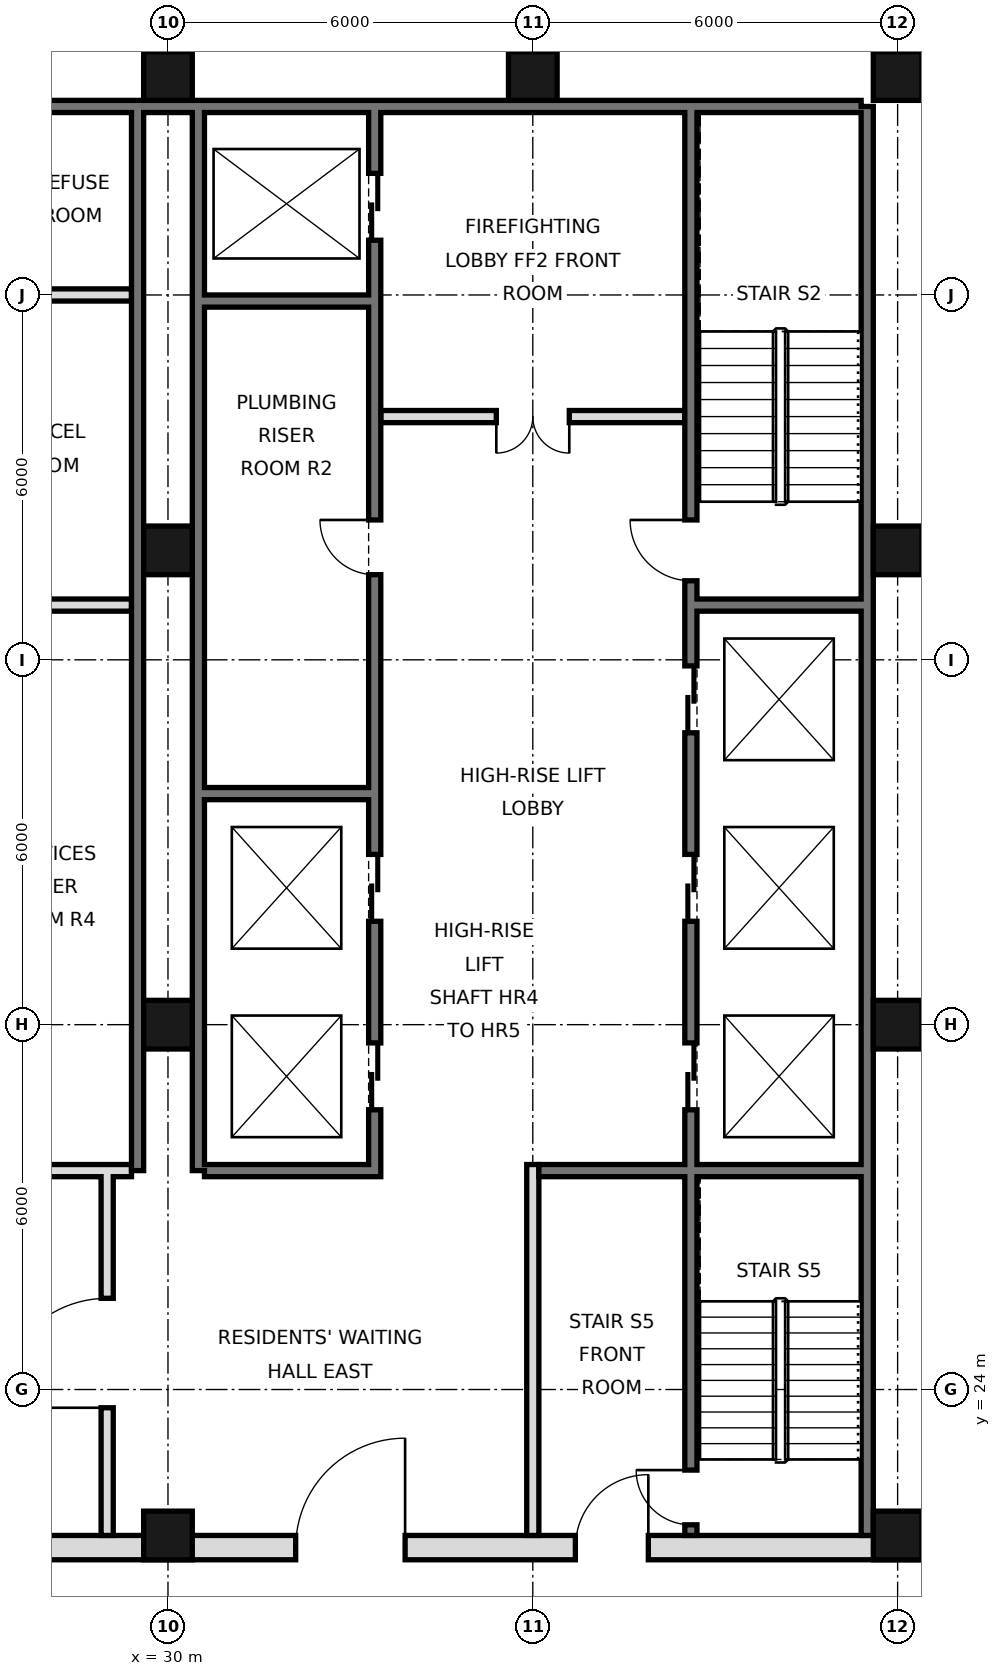
"""IFC4 building model, lengths in metres.
Left out: names, types, materials, properties, quantities, classifications, styles, units other than length and angle.
Written with IfcOpenShell. Run it as: python <this file> out.ifc"""

import sys

from ifc_helpers import new_model, si_unit, direction, frame, frame_2d, origin, origin_2d, place, context, subcontext, project, spatial, rectangle, hollow_rectangle, extrude, element, fill, save


model = new_model("IFC4")
c1 = context("Model", 3, precision=1e-05, world=origin(), true_north=direction((0.0, 1.0)))
c2 = subcontext(c1, "Body", "Model", "MODEL_VIEW")
j1 = project(units=[si_unit("LENGTHUNIT", "METRE"), si_unit("PLANEANGLEUNIT", "RADIAN")], contexts=[c1])
p1 = place(None, origin())
s1 = spatial("IfcSite", under=j1, at=p1, CompositionType="ELEMENT")
p2 = place(p1, origin())
s2 = spatial("IfcBuilding", under=s1, at=p2, CompositionType="ELEMENT")
p3 = place(p2, frame((0.0, 0.0, 270.2)))
s3 = spatial("IfcBuildingStorey", under=s2, at=p3, CompositionType="ELEMENT", Elevation=270.2)
for number, where, z_axis, x_axis in (
    (1, (30.0, 21.6, 0.0), (0.0, 0.0, 1.0), (1.0, 0.0, 0.0)),
    (2, (30.0, 30.0, 0.0), (0.0, 0.0, 1.0), (1.0, 0.0, 0.0)),
    (3, (30.0, 37.8, 0.0), (0.0, 0.0, 1.0), (1.0, 0.0, 0.0)),
    (4, (30.0, 45.6, 0.0), (0.0, 0.0, 1.0), (1.0, 0.0, 0.0)),
    (5, (36.0, 45.6, 0.0), (0.0, 0.0, 1.0), (1.0, 0.0, 0.0)),
    (6, (42.0, 21.6, 0.0), (0.0, 0.0, 1.0), (1.0, 0.0, 0.0)),
    (7, (42.0, 30.0, 0.0), (0.0, 0.0, 1.0), (1.0, 0.0, 0.0)),
    (8, (42.0, 37.8, 0.0), (0.0, 0.0, 1.0), (1.0, 0.0, 0.0)),
    (9, (42.0, 45.6, 0.0), (0.0, 0.0, 1.0), (1.0, 0.0, 0.0)),
):
    element("IfcColumn", number, at=place(p3, frame(where, z_axis=z_axis, x_axis=x_axis)), inside=s3, PredefinedType="COLUMN", context=c2, shape_type="SweptSolid", body=[
        extrude(hollow_rectangle(XDim=0.8, YDim=0.8, WallThickness=0.032, at=origin_2d()), origin(), (0.0, 0.0, 1.0), 3.6),
    ])
p4 = place(p3, frame((41.5, 21.6, 0.0), z_axis=(0.0, 0.0, 1.0), x_axis=(0.0, 1.0, 0.0)))
e10 = element("IfcWall", 10, at=p4, inside=s3, PredefinedType="SOLIDWALL", context=c2, shape_type="SweptSolid", body=[
    extrude(rectangle(XDim=23.5, YDim=0.2, at=frame_2d((11.75, 0.0))), origin(), (0.0, 0.0, 1.0), 3.42),
])
p5 = place(p3, frame((6.6, 45.1, 0.0), z_axis=(0.0, 0.0, 1.0), x_axis=(1.0, 0.0, 0.0)))
e11 = element("IfcWall", 11, at=p5, inside=s3, PredefinedType="SOLIDWALL", context=c2, shape_type="SweptSolid", body=[
    extrude(rectangle(XDim=34.8, YDim=0.2, at=frame_2d((17.4, 0.0))), origin(), (0.0, 0.0, 1.0), 3.42),
])
for number, where, z_axis, x_axis in (
    (12, (29.5, 27.6, 0.0), (0.0, 0.0, 1.0), (0.0, 1.0, 0.0)),
    (13, (30.5, 27.6, 0.0), (0.0, 0.0, 1.0), (0.0, 1.0, 0.0)),
):
    element("IfcWall", number, at=place(p3, frame(where, z_axis=z_axis, x_axis=x_axis)), inside=s3, PredefinedType="SOLIDWALL", context=c2, shape_type="SweptSolid", body=[
        extrude(rectangle(XDim=17.5, YDim=0.2, at=frame_2d((8.75, 0.0))), origin(), (0.0, 0.0, 1.0), 3.42),
    ])
p6 = place(p3, frame((5.6, 21.4, 0.0), z_axis=(0.0, 0.0, 1.0), x_axis=(1.0, 0.0, 0.0)))
e14 = element("IfcWall", 14, at=p6, inside=s3, PredefinedType="SOLIDWALL", context=c2, shape_type="SweptSolid", body=[
    extrude(rectangle(XDim=36.8, YDim=0.4, at=frame_2d((18.4, 0.0))), origin(), (0.0, 0.0, 1.0), 3.42),
])
p7 = place(p6, frame((8.5, 0.0, 0.0)))
e15 = element("IfcOpeningElement", 15, at=p7, cuts=e14, PredefinedType="OPENING", context=c2, shape_type="SweptSolid", body=[
    extrude(rectangle(XDim=1.8, YDim=2.1, at=frame_2d((0.9, 1.05))), frame((0.0, 0.21, 0.0), z_axis=(0.0, -1.0, 0.0), x_axis=(1.0, 0.0, 0.0)), (0.0, 0.0, 1.0), 0.42),
])
p8 = place(p6, frame((17.5, 0.0, 0.0)))
e16 = element("IfcOpeningElement", 16, at=p8, cuts=e14, PredefinedType="OPENING", context=c2, shape_type="SweptSolid", body=[
    extrude(rectangle(XDim=1.8, YDim=2.1, at=frame_2d((0.9, 1.05))), frame((0.0, 0.21, 0.0), z_axis=(0.0, -1.0, 0.0), x_axis=(1.0, 0.0, 0.0)), (0.0, 0.0, 1.0), 0.42),
])
p9 = place(p6, frame((26.5, 0.0, 0.0)))
e17 = element("IfcOpeningElement", 17, at=p9, cuts=e14, PredefinedType="OPENING", context=c2, shape_type="SweptSolid", body=[
    extrude(rectangle(XDim=1.8, YDim=2.1, at=frame_2d((0.9, 1.05))), frame((0.0, 0.21, 0.0), z_axis=(0.0, -1.0, 0.0), x_axis=(1.0, 0.0, 0.0)), (0.0, 0.0, 1.0), 0.42),
])
p10 = place(p6, frame((4.5, 0.0, 0.0)))
e18 = element("IfcOpeningElement", 18, at=p10, cuts=e14, PredefinedType="OPENING", context=c2, shape_type="SweptSolid", body=[
    extrude(rectangle(XDim=1.2, YDim=2.1, at=frame_2d((0.6, 1.05))), frame((0.0, 0.21, 0.0), z_axis=(0.0, -1.0, 0.0), x_axis=(1.0, 0.0, 0.0)), (0.0, 0.0, 1.0), 0.42),
])
p11 = place(p6, frame((31.1, 0.0, 0.0)))
e19 = element("IfcOpeningElement", 19, at=p11, cuts=e14, PredefinedType="OPENING", context=c2, shape_type="SweptSolid", body=[
    extrude(rectangle(XDim=1.2, YDim=2.1, at=frame_2d((0.6, 1.05))), frame((0.0, 0.21, 0.0), z_axis=(0.0, -1.0, 0.0), x_axis=(1.0, 0.0, 0.0)), (0.0, 0.0, 1.0), 0.42),
])
p12 = place(p3, frame((29.0, 21.6, 0.0), z_axis=(0.0, 0.0, 1.0), x_axis=(0.0, 1.0, 0.0)))
e20 = element("IfcWall", 20, at=p12, inside=s3, PredefinedType="PARTITIONING", context=c2, shape_type="SweptSolid", body=[
    extrude(rectangle(XDim=6.0, YDim=0.2, at=frame_2d((3.0, 0.0))), origin(), (0.0, 0.0, 1.0), 3.42),
])
p13 = place(p12, frame((2.1, 0.0, 0.0)))
e21 = element("IfcOpeningElement", 21, at=p13, cuts=e20, PredefinedType="OPENING", context=c2, shape_type="SweptSolid", body=[
    extrude(rectangle(XDim=1.8, YDim=2.1, at=frame_2d((0.9, 1.05))), frame((0.0, 0.11, 0.0), z_axis=(0.0, -1.0, 0.0), x_axis=(1.0, 0.0, 0.0)), (0.0, 0.0, 1.0), 0.22),
])
p14 = place(p3, frame((33.4, 27.5, 0.0), z_axis=(0.0, 0.0, 1.0), x_axis=(0.0, 1.0, 0.0)))
e22 = element("IfcWall", 22, at=p14, inside=s3, PredefinedType="SOLIDWALL", context=c2, shape_type="SweptSolid", body=[
    extrude(rectangle(XDim=17.5, YDim=0.2, at=frame_2d((8.75, 0.0))), origin(), (0.0, 0.0, 1.0), 3.42),
])
p15 = place(p14, frame((1.1, 0.0, 0.0)))
e23 = element("IfcOpeningElement", 23, at=p15, cuts=e22, PredefinedType="OPENING", context=c2, shape_type="SweptSolid", body=[
    extrude(rectangle(XDim=1.1, YDim=2.1, at=frame_2d((0.55, 1.05))), frame((0.0, 0.11, 0.0), z_axis=(0.0, -1.0, 0.0), x_axis=(1.0, 0.0, 0.0)), (0.0, 0.0, 1.0), 0.22),
])
p16 = place(p14, frame((4.2, 0.0, 0.0)))
e24 = element("IfcOpeningElement", 24, at=p16, cuts=e22, PredefinedType="OPENING", context=c2, shape_type="SweptSolid", body=[
    extrude(rectangle(XDim=1.1, YDim=2.1, at=frame_2d((0.55, 1.05))), frame((0.0, 0.11, 0.0), z_axis=(0.0, -1.0, 0.0), x_axis=(1.0, 0.0, 0.0)), (0.0, 0.0, 1.0), 0.22),
])
p17 = place(p14, frame((15.4, 0.0, 0.0)))
e25 = element("IfcOpeningElement", 25, at=p17, cuts=e22, PredefinedType="OPENING", context=c2, shape_type="SweptSolid", body=[
    extrude(rectangle(XDim=1.1, YDim=2.1, at=frame_2d((0.55, 1.05))), frame((0.0, 0.11, 0.0), z_axis=(0.0, -1.0, 0.0), x_axis=(1.0, 0.0, 0.0)), (0.0, 0.0, 1.0), 0.22),
])
p18 = place(p14, frame((9.9, 0.0, 0.0)))
e26 = element("IfcOpeningElement", 26, at=p18, cuts=e22, PredefinedType="OPENING", context=c2, shape_type="SweptSolid", body=[
    extrude(rectangle(XDim=0.9, YDim=2.1, at=frame_2d((0.45, 1.05))), frame((0.0, 0.11, 0.0), z_axis=(0.0, -1.0, 0.0), x_axis=(1.0, 0.0, 0.0)), (0.0, 0.0, 1.0), 0.22),
])
p19 = place(p3, frame((36.0, 21.6, 0.0), z_axis=(0.0, 0.0, 1.0), x_axis=(0.0, 1.0, 0.0)))
e27 = element("IfcWall", 27, at=p19, inside=s3, PredefinedType="PARTITIONING", context=c2, shape_type="SweptSolid", body=[
    extrude(rectangle(XDim=6.1, YDim=0.2, at=frame_2d((3.05, 0.0))), origin(), (0.0, 0.0, 1.0), 3.42),
])
p20 = place(p3, frame((38.6, 21.6, 0.0), z_axis=(0.0, 0.0, 1.0), x_axis=(0.0, 1.0, 0.0)))
e28 = element("IfcWall", 28, at=p20, inside=s3, PredefinedType="SOLIDWALL", context=c2, shape_type="SweptSolid", body=[
    extrude(rectangle(XDim=23.4, YDim=0.2, at=frame_2d((11.7, 0.0))), origin(), (0.0, 0.0, 1.0), 3.42),
])
p21 = place(p20, frame((7.0, 0.0, 0.0)))
e29 = element("IfcOpeningElement", 29, at=p21, cuts=e28, PredefinedType="OPENING", context=c2, shape_type="SweptSolid", body=[
    extrude(rectangle(XDim=1.1, YDim=2.1, at=frame_2d((0.55, 1.05))), frame((0.0, 0.11, 0.0), z_axis=(0.0, -1.0, 0.0), x_axis=(1.0, 0.0, 0.0)), (0.0, 0.0, 1.0), 0.22),
])
p22 = place(p20, frame((10.1, 0.0, 0.0)))
e30 = element("IfcOpeningElement", 30, at=p22, cuts=e28, PredefinedType="OPENING", context=c2, shape_type="SweptSolid", body=[
    extrude(rectangle(XDim=1.1, YDim=2.1, at=frame_2d((0.55, 1.05))), frame((0.0, 0.11, 0.0), z_axis=(0.0, -1.0, 0.0), x_axis=(1.0, 0.0, 0.0)), (0.0, 0.0, 1.0), 0.22),
])
p23 = place(p20, frame((13.2, 0.0, 0.0)))
e31 = element("IfcOpeningElement", 31, at=p23, cuts=e28, PredefinedType="OPENING", context=c2, shape_type="SweptSolid", body=[
    extrude(rectangle(XDim=1.1, YDim=2.1, at=frame_2d((0.55, 1.05))), frame((0.0, 0.11, 0.0), z_axis=(0.0, -1.0, 0.0), x_axis=(1.0, 0.0, 0.0)), (0.0, 0.0, 1.0), 0.22),
])
p24 = place(p20, frame((15.7, 0.0, 0.0)))
e32 = element("IfcOpeningElement", 32, at=p24, cuts=e28, PredefinedType="OPENING", context=c2, shape_type="SweptSolid", body=[
    extrude(rectangle(XDim=1.0, YDim=2.1, at=frame_2d((0.5, 1.05))), frame((0.0, 0.11, 0.0), z_axis=(0.0, -1.0, 0.0), x_axis=(1.0, 0.0, 0.0)), (0.0, 0.0, 1.0), 0.22),
])
p25 = place(p20, frame((0.175, 0.0, 0.0)))
e33 = element("IfcOpeningElement", 33, at=p25, cuts=e28, PredefinedType="OPENING", context=c2, shape_type="SweptSolid", body=[
    extrude(rectangle(XDim=0.9, YDim=2.1, at=frame_2d((0.45, 1.05))), frame((0.0, 0.11, 0.0), z_axis=(0.0, -1.0, 0.0), x_axis=(1.0, 0.0, 0.0)), (0.0, 0.0, 1.0), 0.22),
])
for number, where, z_axis, x_axis in (
    (34, (26.7, 27.6, 0.0), (0.0, 0.0, 1.0), (1.0, 0.0, 0.0)),
    (35, (30.6, 27.6, 0.0), (0.0, 0.0, 1.0), (1.0, 0.0, 0.0)),
):
    element("IfcWall", number, at=place(p3, frame(where, z_axis=z_axis, x_axis=x_axis)), inside=s3, PredefinedType="SOLIDWALL", context=c2, shape_type="SweptSolid", body=[
        extrude(rectangle(XDim=2.7, YDim=0.2, at=frame_2d((1.35, 0.0))), origin(), (0.0, 0.0, 1.0), 3.42),
    ])
p26 = place(p3, frame((36.1, 27.6, 0.0), z_axis=(0.0, 0.0, 1.0), x_axis=(1.0, 0.0, 0.0)))
e36 = element("IfcWall", 36, at=p26, inside=s3, PredefinedType="SOLIDWALL", context=c2, shape_type="SweptSolid", body=[
    extrude(rectangle(XDim=5.3, YDim=0.2, at=frame_2d((2.65, 0.0))), origin(), (0.0, 0.0, 1.0), 3.42),
])
for number, where, z_axis, x_axis in (
    (37, (30.6, 33.8, 0.0), (0.0, 0.0, 1.0), (1.0, 0.0, 0.0)),
    (38, (26.7, 36.9, 0.0), (0.0, 0.0, 1.0), (1.0, 0.0, 0.0)),
    (39, (38.7, 36.9, 0.0), (0.0, 0.0, 1.0), (1.0, 0.0, 0.0)),
):
    element("IfcWall", number, at=place(p3, frame(where, z_axis=z_axis, x_axis=x_axis)), inside=s3, PredefinedType="SOLIDWALL", context=c2, shape_type="SweptSolid", body=[
        extrude(rectangle(XDim=2.7, YDim=0.2, at=frame_2d((1.35, 0.0))), origin(), (0.0, 0.0, 1.0), 3.42),
    ])
p27 = place(p3, frame((33.5, 40.0, 0.0), z_axis=(0.0, 0.0, 1.0), x_axis=(1.0, 0.0, 0.0)))
e40 = element("IfcWall", 40, at=p27, inside=s3, PredefinedType="PARTITIONING", context=c2, shape_type="SweptSolid", body=[
    extrude(rectangle(XDim=5.0, YDim=0.2, at=frame_2d((2.5, 0.0))), origin(), (0.0, 0.0, 1.0), 3.42),
])
p28 = place(p27, frame((1.9, 0.0, 0.0)))
e41 = element("IfcOpeningElement", 41, at=p28, cuts=e40, PredefinedType="OPENING", context=c2, shape_type="SweptSolid", body=[
    extrude(rectangle(XDim=1.2, YDim=2.1, at=frame_2d((0.6, 1.05))), frame((0.0, 0.11, 0.0), z_axis=(0.0, -1.0, 0.0), x_axis=(1.0, 0.0, 0.0)), (0.0, 0.0, 1.0), 0.22),
])
p29 = place(p3, frame((30.6, 41.9, 0.0), z_axis=(0.0, 0.0, 1.0), x_axis=(1.0, 0.0, 0.0)))
e42 = element("IfcWall", 42, at=p29, inside=s3, PredefinedType="SOLIDWALL", context=c2, shape_type="SweptSolid", body=[
    extrude(rectangle(XDim=2.7, YDim=0.2, at=frame_2d((1.35, 0.0))), origin(), (0.0, 0.0, 1.0), 3.42),
])
p30 = place(p3, frame((26.7, 42.0, 0.0), z_axis=(0.0, 0.0, 1.0), x_axis=(1.0, 0.0, 0.0)))
e43 = element("IfcWall", 43, at=p30, inside=s3, PredefinedType="PARTITIONING", context=c2, shape_type="SweptSolid", body=[
    extrude(rectangle(XDim=2.7, YDim=0.2, at=frame_2d((1.35, 0.0))), origin(), (0.0, 0.0, 1.0), 3.42),
])
p31 = place(p13, origin())
e44 = element("IfcDoor", 44, at=p31, inside=s3, OperationType="SINGLE_SWING_LEFT", PredefinedType="DOOR", context=c2, shape_type="SweptSolid", body=[
    extrude(rectangle(XDim=1.8, YDim=2.1, at=frame_2d((0.9, 1.05))), frame((0.0, 0.025, 0.0), z_axis=(0.0, -1.0, 0.0), x_axis=(1.0, 0.0, 0.0)), (0.0, 0.0, 1.0), 0.05),
])
fill(e21, e44)
p32 = place(p9, frame((1.8, 0.0, 0.0), z_axis=(0.0, 0.0, 1.0), x_axis=(-1.0, 0.0, 0.0)))
e45 = element("IfcDoor", 45, at=p32, inside=s3, OperationType="SINGLE_SWING_LEFT", PredefinedType="DOOR", context=c2, shape_type="SweptSolid", body=[
    extrude(rectangle(XDim=1.8, YDim=2.1, at=frame_2d((0.9, 1.05))), frame((0.0, 0.025, 0.0), z_axis=(0.0, -1.0, 0.0), x_axis=(1.0, 0.0, 0.0)), (0.0, 0.0, 1.0), 0.05),
])
fill(e17, e45)
p33 = place(p11, frame((1.2, 0.0, 0.0), z_axis=(0.0, 0.0, 1.0), x_axis=(-1.0, 0.0, 0.0)))
e46 = element("IfcDoor", 46, at=p33, inside=s3, OperationType="SINGLE_SWING_LEFT", PredefinedType="DOOR", context=c2, shape_type="SweptSolid", body=[
    extrude(rectangle(XDim=1.2, YDim=2.1, at=frame_2d((0.6, 1.05))), frame((0.0, 0.025, 0.0), z_axis=(0.0, -1.0, 0.0), x_axis=(1.0, 0.0, 0.0)), (0.0, 0.0, 1.0), 0.05),
])
fill(e19, e46)
p34 = place(p28, frame((1.2, 0.0, 0.0), z_axis=(0.0, 0.0, 1.0), x_axis=(-1.0, 0.0, 0.0)))
e47 = element("IfcDoor", 47, at=p34, inside=s3, OperationType="DOUBLE_DOOR_SINGLE_SWING", PredefinedType="DOOR", context=c2, shape_type="SweptSolid", body=[
    extrude(rectangle(XDim=1.2, YDim=2.1, at=frame_2d((0.6, 1.05))), frame((0.0, 0.025, 0.0), z_axis=(0.0, -1.0, 0.0), x_axis=(1.0, 0.0, 0.0)), (0.0, 0.0, 1.0), 0.05),
])
fill(e41, e47)
p35 = place(p21, origin())
e48 = element("IfcDoor", 48, at=p35, inside=s3, OperationType="DOUBLE_DOOR_SLIDING", PredefinedType="DOOR", context=c2, shape_type="SweptSolid", body=[
    extrude(rectangle(XDim=1.1, YDim=2.1, at=frame_2d((0.55, 1.05))), frame((0.0, 0.025, 0.0), z_axis=(0.0, -1.0, 0.0), x_axis=(1.0, 0.0, 0.0)), (0.0, 0.0, 1.0), 0.05),
])
fill(e29, e48)
p36 = place(p22, origin())
e49 = element("IfcDoor", 49, at=p36, inside=s3, OperationType="DOUBLE_DOOR_SLIDING", PredefinedType="DOOR", context=c2, shape_type="SweptSolid", body=[
    extrude(rectangle(XDim=1.1, YDim=2.1, at=frame_2d((0.55, 1.05))), frame((0.0, 0.025, 0.0), z_axis=(0.0, -1.0, 0.0), x_axis=(1.0, 0.0, 0.0)), (0.0, 0.0, 1.0), 0.05),
])
fill(e30, e49)
p37 = place(p23, origin())
e50 = element("IfcDoor", 50, at=p37, inside=s3, OperationType="DOUBLE_DOOR_SLIDING", PredefinedType="DOOR", context=c2, shape_type="SweptSolid", body=[
    extrude(rectangle(XDim=1.1, YDim=2.1, at=frame_2d((0.55, 1.05))), frame((0.0, 0.025, 0.0), z_axis=(0.0, -1.0, 0.0), x_axis=(1.0, 0.0, 0.0)), (0.0, 0.0, 1.0), 0.05),
])
fill(e31, e50)
p38 = place(p15, origin())
e51 = element("IfcDoor", 51, at=p38, inside=s3, OperationType="DOUBLE_DOOR_SLIDING", PredefinedType="DOOR", context=c2, shape_type="SweptSolid", body=[
    extrude(rectangle(XDim=1.1, YDim=2.1, at=frame_2d((0.55, 1.05))), frame((0.0, 0.025, 0.0), z_axis=(0.0, -1.0, 0.0), x_axis=(1.0, 0.0, 0.0)), (0.0, 0.0, 1.0), 0.05),
])
fill(e23, e51)
p39 = place(p16, origin())
e52 = element("IfcDoor", 52, at=p39, inside=s3, OperationType="DOUBLE_DOOR_SLIDING", PredefinedType="DOOR", context=c2, shape_type="SweptSolid", body=[
    extrude(rectangle(XDim=1.1, YDim=2.1, at=frame_2d((0.55, 1.05))), frame((0.0, 0.025, 0.0), z_axis=(0.0, -1.0, 0.0), x_axis=(1.0, 0.0, 0.0)), (0.0, 0.0, 1.0), 0.05),
])
fill(e24, e52)
p40 = place(p17, origin())
e53 = element("IfcDoor", 53, at=p40, inside=s3, OperationType="DOUBLE_DOOR_SLIDING", PredefinedType="DOOR", context=c2, shape_type="SweptSolid", body=[
    extrude(rectangle(XDim=1.1, YDim=2.1, at=frame_2d((0.55, 1.05))), frame((0.0, 0.025, 0.0), z_axis=(0.0, -1.0, 0.0), x_axis=(1.0, 0.0, 0.0)), (0.0, 0.0, 1.0), 0.05),
])
fill(e25, e53)
p41 = place(p24, frame((1.0, 0.0, 0.0), z_axis=(0.0, 0.0, 1.0), x_axis=(-1.0, 0.0, 0.0)))
e54 = element("IfcDoor", 54, at=p41, inside=s3, OperationType="SINGLE_SWING_LEFT", PredefinedType="DOOR", context=c2, shape_type="SweptSolid", body=[
    extrude(rectangle(XDim=1.0, YDim=2.1, at=frame_2d((0.5, 1.05))), frame((0.0, 0.025, 0.0), z_axis=(0.0, -1.0, 0.0), x_axis=(1.0, 0.0, 0.0)), (0.0, 0.0, 1.0), 0.05),
])
fill(e32, e54)
p42 = place(p25, frame((0.9, 0.0, 0.0), z_axis=(0.0, 0.0, 1.0), x_axis=(-1.0, 0.0, 0.0)))
e55 = element("IfcDoor", 55, at=p42, inside=s3, OperationType="SINGLE_SWING_LEFT", PredefinedType="DOOR", context=c2, shape_type="SweptSolid", body=[
    extrude(rectangle(XDim=0.9, YDim=2.1, at=frame_2d((0.45, 1.05))), frame((0.0, 0.025, 0.0), z_axis=(0.0, -1.0, 0.0), x_axis=(1.0, 0.0, 0.0)), (0.0, 0.0, 1.0), 0.05),
])
fill(e33, e55)
p43 = place(p18, frame((0.9, 0.0, 0.0), z_axis=(0.0, 0.0, 1.0), x_axis=(-1.0, 0.0, 0.0)))
e56 = element("IfcDoor", 56, at=p43, inside=s3, OperationType="SINGLE_SWING_LEFT", PredefinedType="DOOR", context=c2, shape_type="SweptSolid", body=[
    extrude(rectangle(XDim=0.9, YDim=2.1, at=frame_2d((0.45, 1.05))), frame((0.0, 0.025, 0.0), z_axis=(0.0, -1.0, 0.0), x_axis=(1.0, 0.0, 0.0)), (0.0, 0.0, 1.0), 0.05),
])
fill(e26, e56)
save(model, sys.argv[1])
